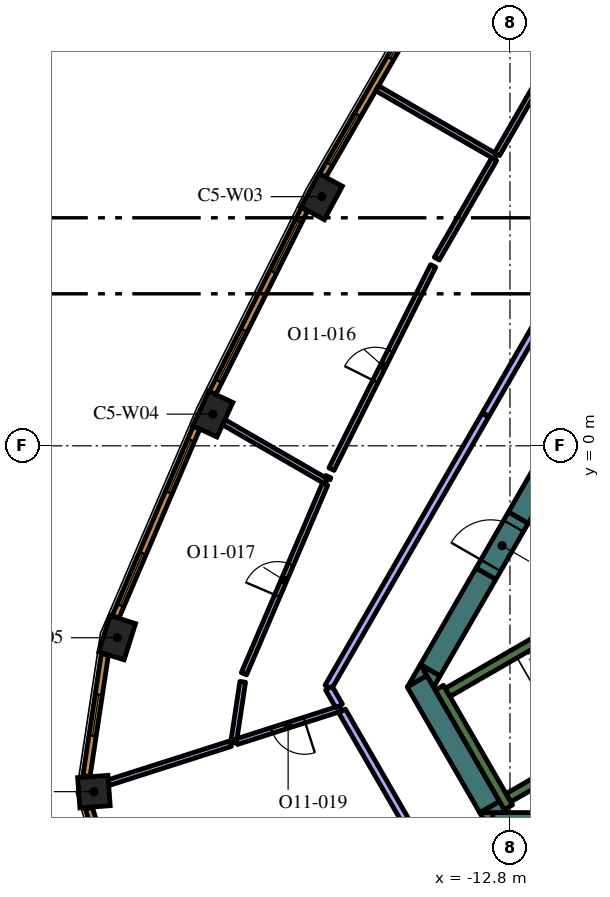
"""IFC4 building model, lengths in metres.
Left out: names, types, materials, properties, quantities, classifications, styles, units other than length and angle.
Written with IfcOpenShell. Run it as: python <this file> out.ifc"""

import sys

from ifc_helpers import new_model, si_unit, direction, frame, frame_2d, origin, origin_2d, place, context, subcontext, project, spatial, polyline, rectangle, outline, extrude, element, fill, save


model = new_model("IFC4")
c1 = context("Model", 3, precision=1e-05, world=origin(), true_north=direction((0.0, 1.0)))
c2 = subcontext(c1, "Body", "Model", "MODEL_VIEW")
j1 = project(units=[si_unit("LENGTHUNIT", "METRE"), si_unit("PLANEANGLEUNIT", "RADIAN")], contexts=[c1])
p1 = place(None, origin())
s1 = spatial("IfcSite", under=j1, at=p1, CompositionType="ELEMENT")
p2 = place(p1, origin())
s2 = spatial("IfcBuilding", under=s1, at=p2, CompositionType="ELEMENT")
p3 = place(p2, frame((0.0, 0.0, 267.0)))
s3 = spatial("IfcBuildingStorey", under=s2, at=p3, CompositionType="ELEMENT", Elevation=267.0)
for number, where, z_axis, x_axis in (
    (1, (-17.756, 6.557, 0.0), (0.0, 0.0, 1.0), (-0.474, -0.881, 0.0)),
    (2, (-20.619, 0.834, 0.0), (0.0, 0.0, 1.0), (-0.421, -0.907, 0.0)),
    (3, (-23.136, -5.049, 0.0), (0.0, 0.0, 1.0), (-0.3, -0.954, 0.0)),
):
    element("IfcColumn", number, at=place(p3, frame(where, z_axis=z_axis, x_axis=x_axis)), inside=s3, PredefinedType="COLUMN", context=c2, shape_type="SweptSolid", body=[
        extrude(rectangle(XDim=1.0, YDim=0.7, at=origin_2d()), origin(), (0.0, 0.0, 1.0), 4.2),
    ])
p4 = place(p3, frame((-23.748, -9.1, 0.0), z_axis=(0.0, 0.0, 1.0), x_axis=(0.074510546573, -0.997220225652, 0.0)))
e4 = element("IfcColumn", 4, at=p4, inside=s3, PredefinedType="COLUMN", context=c2, shape_type="SweptSolid", body=[
    extrude(rectangle(XDim=0.8, YDim=0.8, at=origin_2d()), origin(), (0.0, 0.0, 1.0), 4.2),
])
p5 = place(p3, frame((8.904, -9.95, 0.0), z_axis=(0.0, 0.0, 1.0), x_axis=(-1.0, 0.0, 0.0)))
e5 = element("IfcWall", 5, at=p5, inside=s3, PredefinedType="SOLIDWALL", context=c2, shape_type="SweptSolid", body=[
    extrude(rectangle(XDim=22.161, YDim=0.6, at=frame_2d((11.081, 0.0))), origin(), (0.0, 0.0, 1.0), 4.2),
])
p6 = place(p3, origin())
e6 = element("IfcWall", 6, at=p6, inside=s3, PredefinedType="SOLIDWALL", context=c2, shape_type="SweptSolid", body=[
    extrude(outline(polyline([(-13.597, -9.65), (-13.259, -9.65), (-13.259, -10.236), (-13.597, -9.65)])), origin(), (0.0, 0.0, 1.0), 4.2),
])
p7 = place(p3, frame((-13.333, -9.506, 0.0), z_axis=(0.0, 0.0, 1.0), x_axis=(-0.500019073792, 0.866014391245, 0.0)))
e7 = element("IfcWall", 7, at=p7, inside=s3, PredefinedType="SOLIDWALL", context=c2, shape_type="SweptSolid", body=[
    extrude(rectangle(XDim=3.823, YDim=0.6, at=frame_2d((1.912, 0.0))), origin(), (0.0, 0.0, 1.0), 4.2),
])
e8 = element("IfcWall", 8, at=p6, inside=s3, PredefinedType="SOLIDWALL", context=c2, shape_type="SweptSolid", body=[
    extrude(outline(polyline([(-14.987, -6.043), (-15.493, -6.335), (-15.156, -5.75), (-14.987, -6.043)])), origin(), (0.0, 0.0, 1.0), 4.2),
])
e9 = element("IfcWall", 9, at=p6, inside=s3, PredefinedType="SOLIDWALL", context=c2, shape_type="SweptSolid", body=[
    extrude(outline(polyline([(-12.904, -9.65), (-13.58, -9.65), (-13.073, -9.357), (-12.904, -9.65)])), origin(), (0.0, 0.0, 1.0), 4.2),
])
p8 = place(p3, frame((-13.432, -3.364, 0.0), z_axis=(0.0, 0.0, 1.0), x_axis=(-0.499960127962, -0.866048422692, 0.0)))
e10 = element("IfcWall", 10, at=p8, inside=s3, PredefinedType="SOLIDWALL", context=c2, shape_type="SweptSolid", body=[
    extrude(rectangle(XDim=2.934, YDim=0.6, at=frame_2d((1.467, 0.0))), origin(), (0.0, 0.0, 1.0), 4.2),
])
e11 = element("IfcWall", 11, at=p6, inside=s3, PredefinedType="SOLIDWALL", context=c2, shape_type="SweptSolid", body=[
    extrude(outline(polyline([(-14.809, -6.35), (-15.147, -5.764), (-14.64, -6.057), (-14.809, -6.35)])), origin(), (0.0, 0.0, 1.0), 4.2),
])
p9 = place(p3, frame((-4.652, 11.842, 0.0), z_axis=(0.0, 0.0, 1.0), x_axis=(-0.500003640647, -0.866023301845, 0.0)))
e12 = element("IfcWall", 12, at=p9, inside=s3, PredefinedType="SOLIDWALL", context=c2, shape_type="SweptSolid", body=[
    extrude(rectangle(XDim=15.858, YDim=0.6, at=frame_2d((7.929, 0.0))), origin(), (0.0, 0.0, 1.0), 4.2),
])
p10 = place(p3, frame((-12.84, -9.511, 0.0), z_axis=(0.0, 0.0, 1.0), x_axis=(-0.499997733992, 0.866026712061, 0.0)))
e13 = element("IfcWall", 13, at=p10, inside=s3, PredefinedType="SOLIDWALL", context=c2, shape_type="SweptSolid", body=[
    extrude(rectangle(XDim=3.634, YDim=0.25, at=frame_2d((1.817, 0.0))), origin(), (0.0, 0.0, 1.0), 4.2),
])
p11 = place(p3, frame((-14.44, -6.49, 0.0), z_axis=(0.0, 0.0, 1.0), x_axis=(0.866022966069, 0.500004222222, 0.0)))
e14 = element("IfcWall", 14, at=p11, inside=s3, PredefinedType="SOLIDWALL", context=c2, shape_type="SweptSolid", body=[
    extrude(rectangle(XDim=6.8, YDim=0.25, at=frame_2d((3.4, 0.0))), origin(), (0.0, 0.0, 1.0), 4.2),
])
p12 = place(p3, frame((-12.84, -9.261, 0.0), z_axis=(0.0, 0.0, 1.0), x_axis=(0.866016039709, 0.500016218704, 0.0)))
e15 = element("IfcWall", 15, at=p12, inside=s3, PredefinedType="SOLIDWALL", context=c2, shape_type="SweptSolid", body=[
    extrude(rectangle(XDim=7.05, YDim=0.25, at=frame_2d((3.525, 0.0))), origin(), (0.0, 0.0, 1.0), 4.2),
])
p13 = place(p3, frame((-13.432, -3.364, 0.0), z_axis=(0.0, 0.0, 1.0), x_axis=(0.500000056704, 0.866025371046, 0.0)))
e16 = element("IfcWall", 16, at=p13, inside=s3, PredefinedType="SOLIDWALL", context=c2, shape_type="SweptSolid", body=[
    extrude(rectangle(XDim=1.7, YDim=0.6, at=frame_2d((0.85, 0.0))), origin(), (0.0, 0.0, 1.0), 4.2),
])
p14 = place(p13, frame((0.25, 0.0, 0.0)))
e17 = element("IfcOpeningElement", 17, at=p14, cuts=e16, PredefinedType="OPENING", context=c2, shape_type="SweptSolid", body=[
    extrude(rectangle(XDim=1.2, YDim=2.1, at=frame_2d((0.6, 1.05))), frame((0.0, 0.31, 0.0), z_axis=(0.0, -1.0, 0.0), x_axis=(1.0, 0.0, 0.0)), (0.0, 0.0, 1.0), 0.62),
])
p15 = place(p3, frame((-13.177, 7.608, 0.0), z_axis=(0.0, 0.0, 1.0), x_axis=(-0.866018442252, 0.500012057535, 0.0)))
e18 = element("IfcWall", 18, at=p15, inside=s3, PredefinedType="PARTITIONING", context=c2, shape_type="SweptSolid", body=[
    extrude(rectangle(XDim=3.6, YDim=0.15, at=frame_2d((1.8, 0.0))), origin(), (0.0, 0.0, 1.0), 3.55),
])
p16 = place(p3, frame((-11.736, 10.104, 0.0), z_axis=(0.0, 0.0, 1.0), x_axis=(-0.500011000363, -0.866019052629, 0.0)))
e19 = element("IfcWall", 19, at=p16, inside=s3, PredefinedType="PARTITIONING", context=c2, shape_type="SweptSolid", body=[
    extrude(rectangle(XDim=2.808, YDim=0.15, at=frame_2d((1.404, 0.0))), origin(), (0.0, 0.0, 1.0), 3.55),
])
p17 = place(p3, frame((-17.635, -0.936, 0.0), z_axis=(0.0, 0.0, 1.0), x_axis=(-0.866044607523, 0.499966736674, 0.0)))
e20 = element("IfcWall", 20, at=p17, inside=s3, PredefinedType="PARTITIONING", context=c2, shape_type="SweptSolid", body=[
    extrude(rectangle(XDim=3.115, YDim=0.15, at=frame_2d((1.557, 0.0))), origin(), (0.0, 0.0, 1.0), 3.55),
])
p18 = place(p3, frame((-13.214, 7.543, 0.0), z_axis=(0.0, 0.0, 1.0), x_axis=(-0.499927597274, -0.866067201483, 0.0)))
e21 = element("IfcWall", 21, at=p18, inside=s3, PredefinedType="PARTITIONING", context=c2, shape_type="SweptSolid", body=[
    extrude(rectangle(XDim=3.022, YDim=0.15, at=frame_2d((1.511, 0.0))), origin(), (0.0, 0.0, 1.0), 3.55),
])
p19 = place(p3, frame((-17.497, -0.613, 0.0), z_axis=(0.0, 0.0, 1.0), x_axis=(0.447474899467, 0.894296491297, 0.0)))
e22 = element("IfcWall", 22, at=p19, inside=s3, PredefinedType="PARTITIONING", context=c2, shape_type="SweptSolid", body=[
    extrude(rectangle(XDim=5.979, YDim=0.15, at=frame_2d((2.99, 0.0))), origin(), (0.0, 0.0, 1.0), 3.55),
])
p20 = place(p19, frame((2.58, 0.0, 0.0)))
e23 = element("IfcOpeningElement", 23, at=p20, cuts=e22, PredefinedType="OPENING", context=c2, shape_type="SweptSolid", body=[
    extrude(rectangle(XDim=0.9, YDim=2.1, at=frame_2d((0.45, 1.05))), frame((0.0, 0.085, 0.0), z_axis=(0.0, -1.0, 0.0), x_axis=(1.0, 0.0, 0.0)), (0.0, 0.0, 1.0), 0.17),
])
p21 = place(p3, frame((-17.581, -0.81, 0.0), z_axis=(0.0, 0.0, 1.0), x_axis=(-0.390033474923, -0.92080067791, 0.0)))
e24 = element("IfcWall", 24, at=p21, inside=s3, PredefinedType="PARTITIONING", context=c2, shape_type="SweptSolid", body=[
    extrude(rectangle(XDim=0.061, YDim=0.15, at=frame_2d((0.03, 0.0))), origin(), (0.0, 0.0, 1.0), 3.55),
])
p22 = place(p3, frame((-19.8, -5.998, 0.0), z_axis=(0.0, 0.0, 1.0), x_axis=(0.39332238233, 0.919400621904, 0.0)))
e25 = element("IfcWall", 25, at=p22, inside=s3, PredefinedType="PARTITIONING", context=c2, shape_type="SweptSolid", body=[
    extrude(rectangle(XDim=5.431, YDim=0.15, at=frame_2d((2.715, 0.0))), origin(), (0.0, 0.0, 1.0), 3.55),
])
p23 = place(p22, frame((2.231, 0.0, 0.0)))
e26 = element("IfcOpeningElement", 26, at=p23, cuts=e25, PredefinedType="OPENING", context=c2, shape_type="SweptSolid", body=[
    extrude(rectangle(XDim=0.9, YDim=2.1, at=frame_2d((0.45, 1.05))), frame((0.0, 0.085, 0.0), z_axis=(0.0, -1.0, 0.0), x_axis=(1.0, 0.0, 0.0)), (0.0, 0.0, 1.0), 0.17),
])
p24 = place(p3, frame((-19.833, -6.21, 0.0), z_axis=(0.0, 0.0, 1.0), x_axis=(-0.149305499664, -0.988791114326, 0.0)))
e27 = element("IfcWall", 27, at=p24, inside=s3, PredefinedType="PARTITIONING", context=c2, shape_type="SweptSolid", body=[
    extrude(rectangle(XDim=1.62, YDim=0.15, at=frame_2d((0.81, 0.0))), origin(), (0.0, 0.0, 1.0), 3.55),
])
p25 = place(p3, frame((-20.154, -7.838, 0.0), z_axis=(0.0, 0.0, 1.0), x_axis=(-0.952501497002, -0.304533903217, 0.0)))
e28 = element("IfcWall", 28, at=p25, inside=s3, PredefinedType="PARTITIONING", context=c2, shape_type="SweptSolid", body=[
    extrude(rectangle(XDim=3.37, YDim=0.15, at=frame_2d((1.685, 0.0))), origin(), (0.0, 0.0, 1.0), 3.55),
])
p26 = place(p3, frame((-17.256, -6.911, 0.0), z_axis=(0.0, 0.0, 1.0), x_axis=(-0.95247639241, -0.304612412587, 0.0)))
e29 = element("IfcWall", 29, at=p26, inside=s3, PredefinedType="PARTITIONING", context=c2, shape_type="SweptSolid", body=[
    extrude(rectangle(XDim=2.875, YDim=0.15, at=frame_2d((1.438, 0.0))), origin(), (0.0, 0.0, 1.0), 3.55),
])
p27 = place(p26, frame((1.0, 0.0, 0.0)))
e30 = element("IfcOpeningElement", 30, at=p27, cuts=e29, PredefinedType="OPENING", context=c2, shape_type="SweptSolid", body=[
    extrude(rectangle(XDim=0.9, YDim=2.1, at=frame_2d((0.45, 1.05))), frame((0.0, 0.085, 0.0), z_axis=(0.0, -1.0, 0.0), x_axis=(1.0, 0.0, 0.0)), (0.0, 0.0, 1.0), 0.17),
])
p28 = place(p3, frame((-7.436, 11.221, 0.0), z_axis=(0.0, 0.0, 1.0), x_axis=(-0.49999894854, -0.866026010844, 0.0)))
e31 = element("IfcWall", 31, at=p28, inside=s3, PredefinedType="PARTITIONING", context=c2, shape_type="SweptSolid", body=[
    extrude(rectangle(XDim=12.0, YDim=0.2, at=frame_2d((6.0, 0.0))), origin(), (0.0, 0.0, 1.0), 3.55),
])
p29 = place(p28, frame((5.5, 0.0, 0.0)))
e32 = element("IfcOpeningElement", 32, at=p29, cuts=e31, PredefinedType="OPENING", context=c2, shape_type="SweptSolid", body=[
    extrude(rectangle(XDim=1.0, YDim=2.1, at=frame_2d((0.5, 1.05))), frame((0.0, 0.11, 0.0), z_axis=(0.0, -1.0, 0.0), x_axis=(1.0, 0.0, 0.0)), (0.0, 0.0, 1.0), 0.22),
])
p30 = place(p3, frame((-13.451, 0.803, 0.0), z_axis=(0.0, 0.0, 1.0), x_axis=(-0.499982585408, -0.86603545787, 0.0)))
e33 = element("IfcWall", 33, at=p30, inside=s3, PredefinedType="PARTITIONING", context=c2, shape_type="SweptSolid", body=[
    extrude(rectangle(XDim=8.26, YDim=0.2, at=frame_2d((4.13, 0.0))), origin(), (0.0, 0.0, 1.0), 3.55),
])
p31 = place(p3, frame((-17.565, -6.376, 0.0), z_axis=(0.0, 0.0, 1.0), x_axis=(0.499683376352, -0.866208129376, 0.0)))
e34 = element("IfcWall", 34, at=p31, inside=s3, PredefinedType="PARTITIONING", context=c2, shape_type="SweptSolid", body=[
    extrude(rectangle(XDim=0.541, YDim=0.2, at=frame_2d((0.271, 0.0))), origin(), (0.0, 0.0, 1.0), 3.55),
])
p32 = place(p3, frame((-17.218, -6.978, 0.0), z_axis=(0.0, 0.0, 1.0), x_axis=(0.500012299885, -0.866018302326, 0.0)))
e35 = element("IfcWall", 35, at=p32, inside=s3, PredefinedType="PARTITIONING", context=c2, shape_type="SweptSolid", body=[
    extrude(rectangle(XDim=5.857, YDim=0.2, at=frame_2d((2.929, 0.0))), origin(), (0.0, 0.0, 1.0), 3.55),
])
p33 = place(p3, frame((-15.025, 11.796, 0.0), z_axis=(0.0, 0.0, 1.0), x_axis=(-0.500024767483, -0.866011103799, 0.0)))
e36 = element("IfcWall", 36, at=p33, inside=s3, PredefinedType="SOLIDWALL", context=c2, shape_type="SweptSolid", body=[
    extrude(rectangle(XDim=5.406, YDim=0.19, at=frame_2d((2.703, 0.0))), origin(), (0.0, 0.0, 1.0), 3.95),
])
p34 = place(p33, frame((0.346, 0.0, 0.6)))
e37 = element("IfcOpeningElement", 37, at=p34, cuts=e36, PredefinedType="OPENING", context=c2, shape_type="SweptSolid", body=[
    extrude(rectangle(XDim=1.5, YDim=2.85, at=frame_2d((0.75, 1.425))), frame((0.0, 0.105, 0.0), z_axis=(0.0, -1.0, 0.0), x_axis=(1.0, 0.0, 0.0)), (0.0, 0.0, 1.0), 0.21),
])
p35 = place(p33, frame((3.559, 0.0, 0.6)))
e38 = element("IfcOpeningElement", 38, at=p35, cuts=e36, PredefinedType="OPENING", context=c2, shape_type="SweptSolid", body=[
    extrude(rectangle(XDim=1.5, YDim=2.85, at=frame_2d((0.75, 1.425))), frame((0.0, 0.105, 0.0), z_axis=(0.0, -1.0, 0.0), x_axis=(1.0, 0.0, 0.0)), (0.0, 0.0, 1.0), 0.21),
])
p36 = place(p3, frame((-18.206, 6.227, 0.0), z_axis=(0.0, 0.0, 1.0), x_axis=(-0.447484531401, -0.894291671747, 0.0)))
e39 = element("IfcWall", 39, at=p36, inside=s3, PredefinedType="SOLIDWALL", context=c2, shape_type="SweptSolid", body=[
    extrude(rectangle(XDim=5.406, YDim=0.19, at=frame_2d((2.703, 0.0))), origin(), (0.0, 0.0, 1.0), 3.95),
])
p37 = place(p36, frame((0.346, 0.0, 0.6)))
e40 = element("IfcOpeningElement", 40, at=p37, cuts=e39, PredefinedType="OPENING", context=c2, shape_type="SweptSolid", body=[
    extrude(rectangle(XDim=1.5, YDim=2.85, at=frame_2d((0.75, 1.425))), frame((0.0, 0.105, 0.0), z_axis=(0.0, -1.0, 0.0), x_axis=(1.0, 0.0, 0.0)), (0.0, 0.0, 1.0), 0.21),
])
p38 = place(p36, frame((3.559, 0.0, 0.6)))
e41 = element("IfcOpeningElement", 41, at=p38, cuts=e39, PredefinedType="OPENING", context=c2, shape_type="SweptSolid", body=[
    extrude(rectangle(XDim=1.5, YDim=2.85, at=frame_2d((0.75, 1.425))), frame((0.0, 0.105, 0.0), z_axis=(0.0, -1.0, 0.0), x_axis=(1.0, 0.0, 0.0)), (0.0, 0.0, 1.0), 0.21),
])
p39 = place(p3, frame((-21.049, 0.478, 0.0), z_axis=(0.0, 0.0, 1.0), x_axis=(-0.393347848476, -0.919389726992, 0.0)))
e42 = element("IfcWall", 42, at=p39, inside=s3, PredefinedType="SOLIDWALL", context=c2, shape_type="SweptSolid", body=[
    extrude(rectangle(XDim=5.415, YDim=0.19, at=frame_2d((2.708, 0.0))), origin(), (0.0, 0.0, 1.0), 3.95),
])
p40 = place(p39, frame((0.357, 0.0, 0.6)))
e43 = element("IfcOpeningElement", 43, at=p40, cuts=e42, PredefinedType="OPENING", context=c2, shape_type="SweptSolid", body=[
    extrude(rectangle(XDim=1.5, YDim=2.85, at=frame_2d((0.75, 1.425))), frame((0.0, 0.105, 0.0), z_axis=(0.0, -1.0, 0.0), x_axis=(1.0, 0.0, 0.0)), (0.0, 0.0, 1.0), 0.21),
])
p41 = place(p39, frame((3.593, 0.0, 0.6)))
e44 = element("IfcOpeningElement", 44, at=p41, cuts=e42, PredefinedType="OPENING", context=c2, shape_type="SweptSolid", body=[
    extrude(rectangle(XDim=1.5, YDim=2.85, at=frame_2d((0.75, 1.425))), frame((0.0, 0.105, 0.0), z_axis=(0.0, -1.0, 0.0), x_axis=(1.0, 0.0, 0.0)), (0.0, 0.0, 1.0), 0.21),
])
p42 = place(p3, frame((-23.46, -5.488, 0.0), z_axis=(0.0, 0.0, 1.0), x_axis=(-0.149421055602, -0.988773658702, 0.0)))
e45 = element("IfcWall", 45, at=p42, inside=s3, PredefinedType="SOLIDWALL", context=c2, shape_type="SweptSolid", body=[
    extrude(rectangle(XDim=3.237, YDim=0.19, at=frame_2d((1.618, 0.0))), origin(), (0.0, 0.0, 1.0), 3.95),
])
p43 = place(p42, frame((1.068, 0.0, 0.6)))
e46 = element("IfcOpeningElement", 46, at=p43, cuts=e45, PredefinedType="OPENING", context=c2, shape_type="SweptSolid", body=[
    extrude(rectangle(XDim=1.1, YDim=2.85, at=frame_2d((0.55, 1.425))), frame((0.0, 0.105, 0.0), z_axis=(0.0, -1.0, 0.0), x_axis=(1.0, 0.0, 0.0)), (0.0, 0.0, 1.0), 0.21),
])
p44 = place(p3, frame((-23.881, -9.535, 0.0), z_axis=(0.0, 0.0, 1.0), x_axis=(0.294706210429, -0.9555879078, 0.0)))
e47 = element("IfcWall", 47, at=p44, inside=s3, PredefinedType="SOLIDWALL", context=c2, shape_type="SweptSolid", body=[
    extrude(rectangle(XDim=2.627, YDim=0.19, at=frame_2d((1.313, 0.0))), origin(), (0.0, 0.0, 1.0), 3.95),
])
p45 = place(p44, frame((0.763, 0.0, 0.6)))
e48 = element("IfcOpeningElement", 48, at=p45, cuts=e47, PredefinedType="OPENING", context=c2, shape_type="SweptSolid", body=[
    extrude(rectangle(XDim=1.1, YDim=2.85, at=frame_2d((0.55, 1.425))), frame((0.0, 0.105, 0.0), z_axis=(0.0, -1.0, 0.0), x_axis=(1.0, 0.0, 0.0)), (0.0, 0.0, 1.0), 0.21),
])
p46 = place(p14, origin())
e49 = element("IfcDoor", 49, at=p46, inside=s3, OperationType="SINGLE_SWING_LEFT", PredefinedType="DOOR", context=c2, shape_type="SweptSolid", body=[
    extrude(rectangle(XDim=1.2, YDim=2.1, at=frame_2d((0.6, 1.05))), frame((0.0, 0.025, 0.0), z_axis=(0.0, -1.0, 0.0), x_axis=(1.0, 0.0, 0.0)), (0.0, 0.0, 1.0), 0.05),
])
fill(e17, e49)
p47 = place(p20, origin())
e50 = element("IfcDoor", 50, at=p47, inside=s3, OperationType="SINGLE_SWING_RIGHT", PredefinedType="DOOR", context=c2, shape_type="SweptSolid", body=[
    extrude(rectangle(XDim=0.9, YDim=2.1, at=frame_2d((0.45, 1.05))), frame((0.0, 0.025, 0.0), z_axis=(0.0, -1.0, 0.0), x_axis=(1.0, 0.0, 0.0)), (0.0, 0.0, 1.0), 0.05),
])
fill(e23, e50)
p48 = place(p23, origin())
e51 = element("IfcDoor", 51, at=p48, inside=s3, OperationType="SINGLE_SWING_LEFT", PredefinedType="DOOR", context=c2, shape_type="SweptSolid", body=[
    extrude(rectangle(XDim=0.9, YDim=2.1, at=frame_2d((0.45, 1.05))), frame((0.0, 0.025, 0.0), z_axis=(0.0, -1.0, 0.0), x_axis=(1.0, 0.0, 0.0)), (0.0, 0.0, 1.0), 0.05),
])
fill(e26, e51)
p49 = place(p27, origin())
e52 = element("IfcDoor", 52, at=p49, inside=s3, OperationType="SINGLE_SWING_RIGHT", PredefinedType="DOOR", context=c2, shape_type="SweptSolid", body=[
    extrude(rectangle(XDim=0.9, YDim=2.1, at=frame_2d((0.45, 1.05))), frame((0.0, 0.025, 0.0), z_axis=(0.0, -1.0, 0.0), x_axis=(1.0, 0.0, 0.0)), (0.0, 0.0, 1.0), 0.05),
])
fill(e30, e52)
p50 = place(p34, origin())
e53 = element("IfcWindow", 53, at=p50, inside=s3, PartitioningType="SINGLE_PANEL", PredefinedType="WINDOW", context=c2, shape_type="SweptSolid", body=[
    extrude(rectangle(XDim=1.5, YDim=2.85, at=frame_2d((0.75, 1.425))), frame((0.0, 0.045, 0.0), z_axis=(0.0, -1.0, 0.0), x_axis=(1.0, 0.0, 0.0)), (0.0, 0.0, 1.0), 0.06),
])
fill(e37, e53)
p51 = place(p35, origin())
e54 = element("IfcWindow", 54, at=p51, inside=s3, PartitioningType="SINGLE_PANEL", PredefinedType="WINDOW", context=c2, shape_type="SweptSolid", body=[
    extrude(rectangle(XDim=1.5, YDim=2.85, at=frame_2d((0.75, 1.425))), frame((0.0, 0.045, 0.0), z_axis=(0.0, -1.0, 0.0), x_axis=(1.0, 0.0, 0.0)), (0.0, 0.0, 1.0), 0.06),
])
fill(e38, e54)
p52 = place(p37, origin())
e55 = element("IfcWindow", 55, at=p52, inside=s3, PartitioningType="SINGLE_PANEL", PredefinedType="WINDOW", context=c2, shape_type="SweptSolid", body=[
    extrude(rectangle(XDim=1.5, YDim=2.85, at=frame_2d((0.75, 1.425))), frame((0.0, 0.045, 0.0), z_axis=(0.0, -1.0, 0.0), x_axis=(1.0, 0.0, 0.0)), (0.0, 0.0, 1.0), 0.06),
])
fill(e40, e55)
p53 = place(p38, origin())
e56 = element("IfcWindow", 56, at=p53, inside=s3, PartitioningType="SINGLE_PANEL", PredefinedType="WINDOW", context=c2, shape_type="SweptSolid", body=[
    extrude(rectangle(XDim=1.5, YDim=2.85, at=frame_2d((0.75, 1.425))), frame((0.0, 0.045, 0.0), z_axis=(0.0, -1.0, 0.0), x_axis=(1.0, 0.0, 0.0)), (0.0, 0.0, 1.0), 0.06),
])
fill(e41, e56)
p54 = place(p40, origin())
e57 = element("IfcWindow", 57, at=p54, inside=s3, PartitioningType="SINGLE_PANEL", PredefinedType="WINDOW", context=c2, shape_type="SweptSolid", body=[
    extrude(rectangle(XDim=1.5, YDim=2.85, at=frame_2d((0.75, 1.425))), frame((0.0, 0.045, 0.0), z_axis=(0.0, -1.0, 0.0), x_axis=(1.0, 0.0, 0.0)), (0.0, 0.0, 1.0), 0.06),
])
fill(e43, e57)
p55 = place(p41, origin())
e58 = element("IfcWindow", 58, at=p55, inside=s3, PartitioningType="SINGLE_PANEL", PredefinedType="WINDOW", context=c2, shape_type="SweptSolid", body=[
    extrude(rectangle(XDim=1.5, YDim=2.85, at=frame_2d((0.75, 1.425))), frame((0.0, 0.045, 0.0), z_axis=(0.0, -1.0, 0.0), x_axis=(1.0, 0.0, 0.0)), (0.0, 0.0, 1.0), 0.06),
])
fill(e44, e58)
p56 = place(p43, origin())
e59 = element("IfcWindow", 59, at=p56, inside=s3, PartitioningType="SINGLE_PANEL", PredefinedType="WINDOW", context=c2, shape_type="SweptSolid", body=[
    extrude(rectangle(XDim=1.1, YDim=2.85, at=frame_2d((0.55, 1.425))), frame((0.0, 0.045, 0.0), z_axis=(0.0, -1.0, 0.0), x_axis=(1.0, 0.0, 0.0)), (0.0, 0.0, 1.0), 0.06),
])
fill(e46, e59)
save(model, sys.argv[1])
